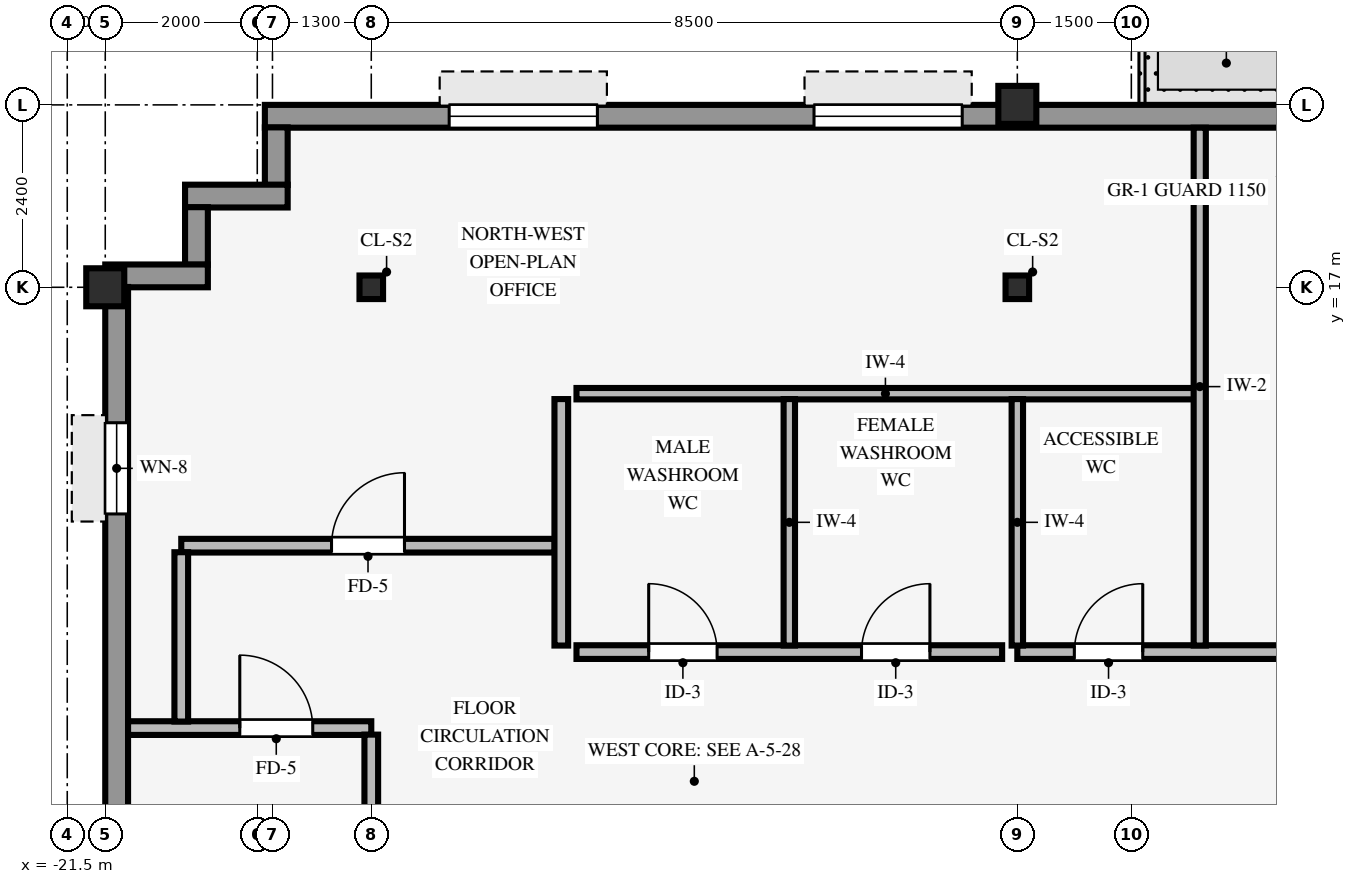
"""IFC4 building model, lengths in metres.
Left out: names, types, materials, properties, quantities, classifications, styles, units other than length and angle.
Written with IfcOpenShell. Run it as: python <this file> out.ifc"""

import sys

from ifc_helpers import new_model, si_unit, direction, frame, frame_2d, origin, origin_2d, place, context, subcontext, project, spatial, rectangle, hollow_rectangle, i_section, extrude, source, transform, mapped, element, fill, save


model = new_model("IFC4")
c1 = context("Model", 3, precision=1e-05, world=origin(), true_north=direction((0.0, 1.0)))
c2 = subcontext(c1, "Body", "Model", "MODEL_VIEW")
j1 = project(units=[si_unit("LENGTHUNIT", "METRE"), si_unit("PLANEANGLEUNIT", "RADIAN")], contexts=[c1])
p1 = place(None, origin())
s1 = spatial("IfcSite", under=j1, at=p1, CompositionType="ELEMENT")
p2 = place(p1, origin())
s2 = spatial("IfcBuilding", under=s1, at=p2, CompositionType="ELEMENT")
p3 = place(p2, frame((0.0, 0.0, 261.6)))
s3 = spatial("IfcBuildingStorey", under=s2, at=p3, CompositionType="ELEMENT", Elevation=261.6)
for number, where, z_axis, x_axis in (
    (1, (-21.0, 17.0, 0.0), (0.0, 0.0, 1.0), (1.0, 0.0, 0.0)),
    (2, (-9.0, 19.4, 0.0), (0.0, 0.0, 1.0), (1.0, 0.0, 0.0)),
):
    element("IfcColumn", number, at=place(p3, frame(where, z_axis=z_axis, x_axis=x_axis)), inside=s3, PredefinedType="COLUMN", context=c2, shape_type="SweptSolid", body=[
        extrude(hollow_rectangle(XDim=0.5, YDim=0.5, WallThickness=0.032, InnerFilletRadius=0.032, OuterFilletRadius=0.064, at=origin_2d()), origin(), (0.0, 0.0, 1.0), 3.37),
    ])
for number, where, z_axis, x_axis in (
    (3, (-17.5, 17.0, 0.0), (0.0, 0.0, 1.0), (1.0, 0.0, 0.0)),
    (4, (-9.0, 17.0, 0.0), (0.0, 0.0, 1.0), (1.0, 0.0, 0.0)),
):
    element("IfcColumn", number, at=place(p3, frame(where, z_axis=z_axis, x_axis=x_axis)), inside=s3, PredefinedType="COLUMN", context=c2, shape_type="SweptSolid", body=[
        extrude(i_section(OverallWidth=0.31, OverallDepth=0.31, WebThickness=0.015, FlangeThickness=0.015, FilletRadius=0.015, at=origin_2d()), origin(), (0.0, 0.0, 1.0), 3.37),
    ])
p4 = place(p3, frame((-18.9, 19.25, 0.0), z_axis=(0.0, 0.0, 1.0), x_axis=(1.0, 0.0, 0.0)))
e5 = element("IfcWall", 5, at=p4, inside=s3, PredefinedType="STANDARD", context=c2, shape_type="SweptSolid", body=[
    extrude(rectangle(XDim=35.6, YDim=0.3, at=frame_2d((17.8, 0.0))), origin(), (0.0, 0.0, 1.0), 2.705),
])
p5 = place(p4, frame((13.6, 0.0, 0.0)))
e6 = element("IfcOpeningElement", 6, at=p5, cuts=e5, PredefinedType="OPENING", context=c2, shape_type="SweptSolid", body=[
    extrude(rectangle(XDim=0.98, YDim=2.15, at=frame_2d((0.49, 1.075))), frame((0.0, 0.16, 0.0), z_axis=(0.0, -1.0, 0.0), x_axis=(1.0, 0.0, 0.0)), (0.0, 0.0, 1.0), 0.32),
])
p6 = place(p4, frame((2.425, 0.0, 0.8)))
e7 = element("IfcOpeningElement", 7, at=p6, cuts=e5, PredefinedType="OPENING", context=c2, shape_type="SweptSolid", body=[
    extrude(rectangle(XDim=1.95, YDim=1.48, at=frame_2d((0.975, 0.74))), frame((0.0, 0.16, 0.0), z_axis=(0.0, -1.0, 0.0), x_axis=(1.0, 0.0, 0.0)), (0.0, 0.0, 1.0), 0.32),
])
p7 = place(p4, frame((7.225, 0.0, 0.8)))
e8 = element("IfcOpeningElement", 8, at=p7, cuts=e5, PredefinedType="OPENING", context=c2, shape_type="SweptSolid", body=[
    extrude(rectangle(XDim=1.95, YDim=1.48, at=frame_2d((0.975, 0.74))), frame((0.0, 0.16, 0.0), z_axis=(0.0, -1.0, 0.0), x_axis=(1.0, 0.0, 0.0)), (0.0, 0.0, 1.0), 0.32),
])
p8 = place(p4, frame((15.475, 0.0, 0.8)))
e9 = element("IfcOpeningElement", 9, at=p8, cuts=e5, PredefinedType="OPENING", context=c2, shape_type="SweptSolid", body=[
    extrude(rectangle(XDim=1.95, YDim=1.48, at=frame_2d((0.975, 0.74))), frame((0.0, 0.16, 0.0), z_axis=(0.0, -1.0, 0.0), x_axis=(1.0, 0.0, 0.0)), (0.0, 0.0, 1.0), 0.32),
])
p9 = place(p4, frame((21.625, 0.0, 0.8)))
e10 = element("IfcOpeningElement", 10, at=p9, cuts=e5, PredefinedType="OPENING", context=c2, shape_type="SweptSolid", body=[
    extrude(rectangle(XDim=1.95, YDim=1.48, at=frame_2d((0.975, 0.74))), frame((0.0, 0.16, 0.0), z_axis=(0.0, -1.0, 0.0), x_axis=(1.0, 0.0, 0.0)), (0.0, 0.0, 1.0), 0.32),
])
p10 = place(p4, frame((32.575, 0.0, 0.8)))
e11 = element("IfcOpeningElement", 11, at=p10, cuts=e5, PredefinedType="OPENING", context=c2, shape_type="SweptSolid", body=[
    extrude(rectangle(XDim=1.95, YDim=1.48, at=frame_2d((0.975, 0.74))), frame((0.0, 0.16, 0.0), z_axis=(0.0, -1.0, 0.0), x_axis=(1.0, 0.0, 0.0)), (0.0, 0.0, 1.0), 0.32),
])
p11 = place(p3, frame((-18.75, 18.346, 0.0), z_axis=(0.0, 0.0, 1.0), x_axis=(0.0, 1.0, 0.0)))
e12 = element("IfcWall", 12, at=p11, inside=s3, PredefinedType="STANDARD", context=c2, shape_type="SweptSolid", body=[
    extrude(rectangle(XDim=0.758, YDim=0.3, at=frame_2d((0.379, 0.0))), origin(), (0.0, 0.0, 1.0), 2.892),
])
p12 = place(p3, frame((-19.95, 18.2, 0.0), z_axis=(0.0, 0.0, 1.0), x_axis=(1.0, 0.0, 0.0)))
e13 = element("IfcWall", 13, at=p12, inside=s3, PredefinedType="STANDARD", context=c2, shape_type="SweptSolid", body=[
    extrude(rectangle(XDim=1.35, YDim=0.3, at=frame_2d((0.675, 0.0))), origin(), (0.0, 0.0, 1.0), 2.892),
])
p13 = place(p3, frame((-19.8, 17.296, 0.0), z_axis=(0.0, 0.0, 1.0), x_axis=(0.0, 1.0, 0.0)))
e14 = element("IfcWall", 14, at=p13, inside=s3, PredefinedType="STANDARD", context=c2, shape_type="SweptSolid", body=[
    extrude(rectangle(XDim=0.758, YDim=0.3, at=frame_2d((0.379, 0.0))), origin(), (0.0, 0.0, 1.0), 2.892),
])
p14 = place(p3, frame((-21.0, 17.15, 0.0), z_axis=(0.0, 0.0, 1.0), x_axis=(1.0, 0.0, 0.0)))
e15 = element("IfcWall", 15, at=p14, inside=s3, PredefinedType="STANDARD", context=c2, shape_type="SweptSolid", body=[
    extrude(rectangle(XDim=1.35, YDim=0.3, at=frame_2d((0.675, 0.0))), origin(), (0.0, 0.0, 1.0), 2.892),
])
p15 = place(p3, frame((-20.85, -17.004, 0.0), z_axis=(0.0, 0.0, 1.0), x_axis=(0.0, 1.0, 0.0)))
e16 = element("IfcWall", 16, at=p15, inside=s3, PredefinedType="STANDARD", context=c2, shape_type="SweptSolid", body=[
    extrude(rectangle(XDim=34.008, YDim=0.3, at=frame_2d((17.004, 0.0))), origin(), (0.0, 0.0, 1.0), 2.705),
])
p16 = place(p15, frame((1.786, 0.0, 0.8)))
e17 = element("IfcOpeningElement", 17, at=p16, cuts=e16, PredefinedType="OPENING", context=c2, shape_type="SweptSolid", body=[
    extrude(rectangle(XDim=1.2, YDim=1.48, at=frame_2d((0.6, 0.74))), frame((0.0, 0.16, 0.0), z_axis=(0.0, -1.0, 0.0), x_axis=(1.0, 0.0, 0.0)), (0.0, 0.0, 1.0), 0.32),
])
p17 = place(p15, frame((8.159, 0.0, 0.8)))
e18 = element("IfcOpeningElement", 18, at=p17, cuts=e16, PredefinedType="OPENING", context=c2, shape_type="SweptSolid", body=[
    extrude(rectangle(XDim=1.2, YDim=1.48, at=frame_2d((0.6, 0.74))), frame((0.0, 0.16, 0.0), z_axis=(0.0, -1.0, 0.0), x_axis=(1.0, 0.0, 0.0)), (0.0, 0.0, 1.0), 0.32),
])
p18 = place(p15, frame((11.831, 0.0, 0.8)))
e19 = element("IfcOpeningElement", 19, at=p18, cuts=e16, PredefinedType="OPENING", context=c2, shape_type="SweptSolid", body=[
    extrude(rectangle(XDim=1.2, YDim=1.48, at=frame_2d((0.6, 0.74))), frame((0.0, 0.16, 0.0), z_axis=(0.0, -1.0, 0.0), x_axis=(1.0, 0.0, 0.0)), (0.0, 0.0, 1.0), 0.32),
])
p19 = place(p15, frame((17.754, 0.0, 0.8)))
e20 = element("IfcOpeningElement", 20, at=p19, cuts=e16, PredefinedType="OPENING", context=c2, shape_type="SweptSolid", body=[
    extrude(rectangle(XDim=1.2, YDim=1.48, at=frame_2d((0.6, 0.74))), frame((0.0, 0.16, 0.0), z_axis=(0.0, -1.0, 0.0), x_axis=(1.0, 0.0, 0.0)), (0.0, 0.0, 1.0), 0.32),
])
p20 = place(p15, frame((20.977, 0.0, 0.8)))
e21 = element("IfcOpeningElement", 21, at=p20, cuts=e16, PredefinedType="OPENING", context=c2, shape_type="SweptSolid", body=[
    extrude(rectangle(XDim=1.2, YDim=1.48, at=frame_2d((0.6, 0.74))), frame((0.0, 0.16, 0.0), z_axis=(0.0, -1.0, 0.0), x_axis=(1.0, 0.0, 0.0)), (0.0, 0.0, 1.0), 0.32),
])
p21 = place(p15, frame((24.649, 0.0, 0.8)))
e22 = element("IfcOpeningElement", 22, at=p21, cuts=e16, PredefinedType="OPENING", context=c2, shape_type="SweptSolid", body=[
    extrude(rectangle(XDim=1.2, YDim=1.48, at=frame_2d((0.6, 0.74))), frame((0.0, 0.16, 0.0), z_axis=(0.0, -1.0, 0.0), x_axis=(1.0, 0.0, 0.0)), (0.0, 0.0, 1.0), 0.32),
])
p22 = place(p15, frame((31.022, 0.0, 0.8)))
e23 = element("IfcOpeningElement", 23, at=p22, cuts=e16, PredefinedType="OPENING", context=c2, shape_type="SweptSolid", body=[
    extrude(rectangle(XDim=1.2, YDim=1.48, at=frame_2d((0.6, 0.74))), frame((0.0, 0.16, 0.0), z_axis=(0.0, -1.0, 0.0), x_axis=(1.0, 0.0, 0.0)), (0.0, 0.0, 1.0), 0.32),
])
p23 = place(p3, frame((-20.7, 11.2, 0.0), z_axis=(0.0, 0.0, 1.0), x_axis=(1.0, 0.0, 0.0)))
e24 = element("IfcWall", 24, at=p23, inside=s3, PredefinedType="PARTITIONING", context=c2, shape_type="SweptSolid", body=[
    extrude(rectangle(XDim=3.2, YDim=0.18, at=frame_2d((1.6, 0.0))), origin(), (0.0, 0.0, 1.0), 3.36),
])
p24 = place(p23, frame((1.47, 0.0, 0.0)))
e25 = element("IfcOpeningElement", 25, at=p24, cuts=e24, PredefinedType="OPENING", context=c2, shape_type="SweptSolid", body=[
    extrude(rectangle(XDim=0.96, YDim=2.1, at=frame_2d((0.48, 1.05))), frame((0.0, 0.1, 0.0), z_axis=(0.0, -1.0, 0.0), x_axis=(1.0, 0.0, 0.0)), (0.0, 0.0, 1.0), 0.2),
])
p25 = place(p3, frame((-14.8, 12.2, 0.0), z_axis=(0.0, 0.0, 1.0), x_axis=(1.0, 0.0, 0.0)))
e26 = element("IfcWall", 26, at=p25, inside=s3, PredefinedType="PARTITIONING", context=c2, shape_type="SweptSolid", body=[
    extrude(rectangle(XDim=5.6, YDim=0.18, at=frame_2d((2.8, 0.0))), origin(), (0.0, 0.0, 1.0), 3.36),
])
p26 = place(p25, frame((0.95, 0.0, 0.0)))
e27 = element("IfcOpeningElement", 27, at=p26, cuts=e26, PredefinedType="OPENING", context=c2, shape_type="SweptSolid", body=[
    extrude(rectangle(XDim=0.9, YDim=2.1, at=frame_2d((0.45, 1.05))), frame((0.0, 0.1, 0.0), z_axis=(0.0, -1.0, 0.0), x_axis=(1.0, 0.0, 0.0)), (0.0, 0.0, 1.0), 0.2),
])
p27 = place(p25, frame((3.75, 0.0, 0.0)))
e28 = element("IfcOpeningElement", 28, at=p27, cuts=e26, PredefinedType="OPENING", context=c2, shape_type="SweptSolid", body=[
    extrude(rectangle(XDim=0.9, YDim=2.1, at=frame_2d((0.45, 1.05))), frame((0.0, 0.1, 0.0), z_axis=(0.0, -1.0, 0.0), x_axis=(1.0, 0.0, 0.0)), (0.0, 0.0, 1.0), 0.2),
])
p28 = place(p3, frame((-9.0, 12.2, 0.0), z_axis=(0.0, 0.0, 1.0), x_axis=(1.0, 0.0, 0.0)))
e29 = element("IfcWall", 29, at=p28, inside=s3, PredefinedType="PARTITIONING", context=c2, shape_type="SweptSolid", body=[
    extrude(rectangle(XDim=24.8, YDim=0.18, at=frame_2d((12.4, 0.0))), origin(), (0.0, 0.0, 1.0), 3.36),
])
p29 = place(p28, frame((11.42, 0.0, 0.0)))
e30 = element("IfcOpeningElement", 30, at=p29, cuts=e29, PredefinedType="OPENING", context=c2, shape_type="SweptSolid", body=[
    extrude(rectangle(XDim=0.96, YDim=2.1, at=frame_2d((0.48, 1.05))), frame((0.0, 0.1, 0.0), z_axis=(0.0, -1.0, 0.0), x_axis=(1.0, 0.0, 0.0)), (0.0, 0.0, 1.0), 0.2),
])
p30 = place(p28, frame((4.82, 0.0, 0.0)))
e31 = element("IfcOpeningElement", 31, at=p30, cuts=e29, PredefinedType="OPENING", context=c2, shape_type="SweptSolid", body=[
    extrude(rectangle(XDim=0.96, YDim=2.1, at=frame_2d((0.48, 1.05))), frame((0.0, 0.1, 0.0), z_axis=(0.0, -1.0, 0.0), x_axis=(1.0, 0.0, 0.0)), (0.0, 0.0, 1.0), 0.2),
])
p31 = place(p28, frame((19.52, 0.0, 0.0)))
e32 = element("IfcOpeningElement", 32, at=p31, cuts=e29, PredefinedType="OPENING", context=c2, shape_type="SweptSolid", body=[
    extrude(rectangle(XDim=0.96, YDim=2.1, at=frame_2d((0.48, 1.05))), frame((0.0, 0.1, 0.0), z_axis=(0.0, -1.0, 0.0), x_axis=(1.0, 0.0, 0.0)), (0.0, 0.0, 1.0), 0.2),
])
p32 = place(p28, frame((22.92, 0.0, 0.0)))
e33 = element("IfcOpeningElement", 33, at=p32, cuts=e29, PredefinedType="OPENING", context=c2, shape_type="SweptSolid", body=[
    extrude(rectangle(XDim=0.96, YDim=2.1, at=frame_2d((0.48, 1.05))), frame((0.0, 0.1, 0.0), z_axis=(0.0, -1.0, 0.0), x_axis=(1.0, 0.0, 0.0)), (0.0, 0.0, 1.0), 0.2),
])
p33 = place(p28, frame((0.75, 0.0, 0.0)))
e34 = element("IfcOpeningElement", 34, at=p33, cuts=e29, PredefinedType="OPENING", context=c2, shape_type="SweptSolid", body=[
    extrude(rectangle(XDim=0.9, YDim=2.1, at=frame_2d((0.45, 1.05))), frame((0.0, 0.1, 0.0), z_axis=(0.0, -1.0, 0.0), x_axis=(1.0, 0.0, 0.0)), (0.0, 0.0, 1.0), 0.2),
])
p34 = place(p3, frame((-20.0, 13.6, 0.0), z_axis=(0.0, 0.0, 1.0), x_axis=(1.0, 0.0, 0.0)))
e35 = element("IfcWall", 35, at=p34, inside=s3, PredefinedType="PARTITIONING", context=c2, shape_type="SweptSolid", body=[
    extrude(rectangle(XDim=4.914, YDim=0.18, at=frame_2d((2.457, 0.0))), origin(), (0.0, 0.0, 1.0), 3.038),
])
p35 = place(p34, frame((1.977, 0.0, 0.0)))
e36 = element("IfcOpeningElement", 36, at=p35, cuts=e35, PredefinedType="OPENING", context=c2, shape_type="SweptSolid", body=[
    extrude(rectangle(XDim=0.96, YDim=2.1, at=frame_2d((0.48, 1.05))), frame((0.0, 0.1, 0.0), z_axis=(0.0, -1.0, 0.0), x_axis=(1.0, 0.0, 0.0)), (0.0, 0.0, 1.0), 0.2),
])
p36 = place(p3, frame((-14.8, 15.6, 0.0), z_axis=(0.0, 0.0, 1.0), x_axis=(1.0, 0.0, 0.0)))
e37 = element("IfcWall", 37, at=p36, inside=s3, PredefinedType="PARTITIONING", context=c2, shape_type="SweptSolid", body=[
    extrude(rectangle(XDim=8.129, YDim=0.15, at=frame_2d((4.064, 0.0))), origin(), (0.0, 0.0, 1.0), 3.36),
])
p37 = place(p3, frame((-20.0, 11.286, 0.0), z_axis=(0.0, 0.0, 1.0), x_axis=(0.0, 1.0, 0.0)))
e38 = element("IfcWall", 38, at=p37, inside=s3, PredefinedType="PARTITIONING", context=c2, shape_type="SweptSolid", body=[
    extrude(rectangle(XDim=2.228, YDim=0.18, at=frame_2d((1.114, 0.0))), origin(), (0.0, 0.0, 1.0), 3.36),
])
p38 = place(p3, frame((-17.5, 9.996, 0.0), z_axis=(0.0, 0.0, 1.0), x_axis=(0.0, 1.0, 0.0)))
e39 = element("IfcWall", 39, at=p38, inside=s3, PredefinedType="PARTITIONING", context=c2, shape_type="SweptSolid", body=[
    extrude(rectangle(XDim=1.118, YDim=0.18, at=frame_2d((0.559, 0.0))), origin(), (0.0, 0.0, 1.0), 2.892),
])
p39 = place(p3, frame((-15.0, 12.286, 0.0), z_axis=(0.0, 0.0, 1.0), x_axis=(0.0, 1.0, 0.0)))
e40 = element("IfcWall", 40, at=p39, inside=s3, PredefinedType="PARTITIONING", context=c2, shape_type="SweptSolid", body=[
    extrude(rectangle(XDim=3.243, YDim=0.18, at=frame_2d((1.622, 0.0))), origin(), (0.0, 0.0, 1.0), 3.36),
])
p40 = place(p3, frame((-12.0, 12.286, 0.0), z_axis=(0.0, 0.0, 1.0), x_axis=(0.0, 1.0, 0.0)))
e41 = element("IfcWall", 41, at=p40, inside=s3, PredefinedType="PARTITIONING", context=c2, shape_type="SweptSolid", body=[
    extrude(rectangle(XDim=3.243, YDim=0.15, at=frame_2d((1.622, 0.0))), origin(), (0.0, 0.0, 1.0), 3.36),
])
p41 = place(p3, frame((-9.0, 12.286, 0.0), z_axis=(0.0, 0.0, 1.0), x_axis=(0.0, 1.0, 0.0)))
e42 = element("IfcWall", 42, at=p41, inside=s3, PredefinedType="PARTITIONING", context=c2, shape_type="SweptSolid", body=[
    extrude(rectangle(XDim=3.243, YDim=0.15, at=frame_2d((1.622, 0.0))), origin(), (0.0, 0.0, 1.0), 2.892),
])
p42 = place(p3, frame((-6.6, 12.286, 0.0), z_axis=(0.0, 0.0, 1.0), x_axis=(0.0, 1.0, 0.0)))
e43 = element("IfcWall", 43, at=p42, inside=s3, PredefinedType="PARTITIONING", context=c2, shape_type="SweptSolid", body=[
    extrude(rectangle(XDim=6.814, YDim=0.16, at=frame_2d((3.407, 0.0))), origin(), (0.0, 0.0, 1.0), 3.36),
])
m1 = source(origin(), c2, "Body", "SweptSolid", [
    extrude(rectangle(XDim=1.95, YDim=1.48, at=frame_2d((0.975, 0.74))), frame((0.0, 0.03, 0.0), z_axis=(0.0, -1.0, 0.0), x_axis=(1.0, 0.0, 0.0)), (0.0, 0.0, 1.0), 0.06),
])
p43 = place(p6, origin())
e44 = element("IfcWindow", 44, at=p43, inside=s3, PartitioningType="SINGLE_PANEL", PredefinedType="WINDOW", context=c2, shape_type="MappedRepresentation", body=[
    mapped(m1, transform((0.0, 0.0, 0.0), scale=1.0)),
])
fill(e7, e44)
p44 = place(p7, origin())
e45 = element("IfcWindow", 45, at=p44, inside=s3, PartitioningType="SINGLE_PANEL", PredefinedType="WINDOW", context=c2, shape_type="MappedRepresentation", body=[
    mapped(m1, transform((0.0, 0.0, 0.0), scale=1.0)),
])
fill(e8, e45)
m2 = source(origin(), c2, "Body", "SweptSolid", [
    extrude(rectangle(XDim=1.2, YDim=1.48, at=frame_2d((0.6, 0.74))), frame((0.0, 0.03, 0.0), z_axis=(0.0, -1.0, 0.0), x_axis=(1.0, 0.0, 0.0)), (0.0, 0.0, 1.0), 0.06),
])
p45 = place(p22, origin())
e46 = element("IfcWindow", 46, at=p45, inside=s3, PartitioningType="SINGLE_PANEL", PredefinedType="WINDOW", context=c2, shape_type="MappedRepresentation", body=[
    mapped(m2, transform((0.0, 0.0, 0.0), scale=1.0)),
])
fill(e23, e46)
m3 = source(origin(), c2, "Body", "SweptSolid", [
    extrude(rectangle(XDim=0.96, YDim=2.1, at=frame_2d((0.48, 1.05))), frame((0.0, 0.025, 0.0), z_axis=(0.0, -1.0, 0.0), x_axis=(1.0, 0.0, 0.0)), (0.0, 0.0, 1.0), 0.05),
])
p46 = place(p35, origin())
e47 = element("IfcDoor", 47, at=p46, inside=s3, OperationType="SINGLE_SWING_RIGHT", PredefinedType="DOOR", context=c2, shape_type="MappedRepresentation", body=[
    mapped(m3, transform((0.0, 0.0, 0.0), scale=1.0)),
])
fill(e36, e47)
m4 = source(origin(), c2, "Body", "SweptSolid", [
    extrude(rectangle(XDim=0.9, YDim=2.1, at=frame_2d((0.45, 1.05))), frame((0.0, 0.025, 0.0), z_axis=(0.0, -1.0, 0.0), x_axis=(1.0, 0.0, 0.0)), (0.0, 0.0, 1.0), 0.05),
])
p47 = place(p26, origin())
e48 = element("IfcDoor", 48, at=p47, inside=s3, OperationType="SINGLE_SWING_LEFT", PredefinedType="DOOR", context=c2, shape_type="MappedRepresentation", body=[
    mapped(m4, transform((0.0, 0.0, 0.0), scale=1.0)),
])
fill(e27, e48)
p48 = place(p27, origin())
e49 = element("IfcDoor", 49, at=p48, inside=s3, OperationType="SINGLE_SWING_RIGHT", PredefinedType="DOOR", context=c2, shape_type="MappedRepresentation", body=[
    mapped(m4, transform((0.0, 0.0, 0.0), scale=1.0)),
])
fill(e28, e49)
p49 = place(p24, origin())
e50 = element("IfcDoor", 50, at=p49, inside=s3, OperationType="SINGLE_SWING_LEFT", PredefinedType="DOOR", context=c2, shape_type="MappedRepresentation", body=[
    mapped(m3, transform((0.0, 0.0, 0.0), scale=1.0)),
])
fill(e25, e50)
p50 = place(p33, origin())
e51 = element("IfcDoor", 51, at=p50, inside=s3, OperationType="SINGLE_SWING_RIGHT", PredefinedType="DOOR", context=c2, shape_type="MappedRepresentation", body=[
    mapped(m4, transform((0.0, 0.0, 0.0), scale=1.0)),
])
fill(e34, e51)
save(model, sys.argv[1])
